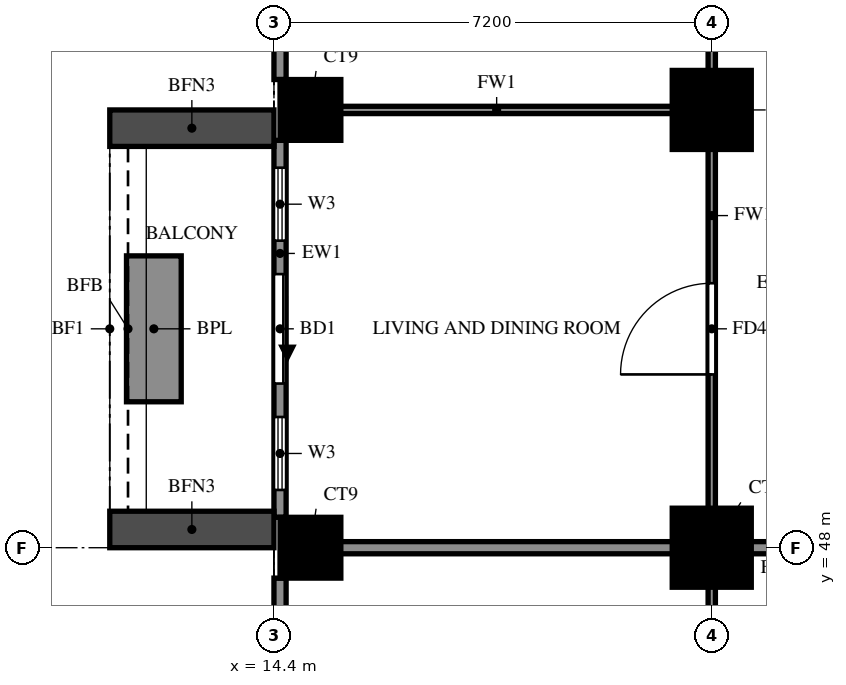
"""IFC4 building model, lengths in metres.
Left out: names, types, materials, properties, quantities, classifications, styles, units other than length and angle.
Written with IfcOpenShell. Run it as: python <this file> out.ifc"""

import sys

from ifc_helpers import new_model, si_unit, direction, frame, frame_2d, origin, origin_2d, place, context, subcontext, project, spatial, rectangle, extrude, source, transform, mapped, element, fill, save


model = new_model("IFC4")
c1 = context("Model", 3, precision=1e-05, world=origin(), true_north=direction((0.0, 1.0)))
c2 = subcontext(c1, "Body", "Model", "MODEL_VIEW")
j1 = project(units=[si_unit("LENGTHUNIT", "METRE"), si_unit("PLANEANGLEUNIT", "RADIAN")], contexts=[c1])
p1 = place(None, origin())
s1 = spatial("IfcSite", under=j1, at=p1, CompositionType="ELEMENT")
p2 = place(p1, origin())
s2 = spatial("IfcBuilding", under=s1, at=p2, CompositionType="ELEMENT")
p3 = place(p2, frame((0.0, 0.0, 79.5)))
s3 = spatial("IfcBuildingStorey", under=s2, at=p3, CompositionType="ELEMENT", Elevation=79.5)
m1 = source(origin(), c2, "Body", "SweptSolid", [
    extrude(rectangle(XDim=1.0, YDim=1.0, at=origin_2d()), origin(), (0.0, 0.0, 1.0), 3.18),
])
p4 = place(p3, frame((15.0, 48.0, 0.0), z_axis=(0.0, 0.0, 1.0), x_axis=(1.0, 0.0, 0.0)))
e1 = element("IfcColumn", 1, at=p4, inside=s3, PredefinedType="COLUMN", context=c2, shape_type="MappedRepresentation", body=[
    mapped(m1, transform((0.0, 0.0, 0.0))),
])
m2 = source(origin(), c2, "Body", "SweptSolid", [
    extrude(rectangle(XDim=1.3, YDim=1.3, at=origin_2d()), origin(), (0.0, 0.0, 1.0), 3.18),
])
p5 = place(p3, frame((21.6, 48.0, 0.0), z_axis=(0.0, 0.0, 1.0), x_axis=(1.0, 0.0, 0.0)))
e2 = element("IfcColumn", 2, at=p5, inside=s3, PredefinedType="COLUMN", context=c2, shape_type="MappedRepresentation", body=[
    mapped(m2, transform((0.0, 0.0, 0.0))),
])
p6 = place(p3, frame((15.0, 55.2, 0.0), z_axis=(0.0, 0.0, 1.0), x_axis=(1.0, 0.0, 0.0)))
e3 = element("IfcColumn", 3, at=p6, inside=s3, PredefinedType="COLUMN", context=c2, shape_type="MappedRepresentation", body=[
    mapped(m1, transform((0.0, 0.0, 0.0))),
])
p7 = place(p3, frame((21.6, 55.2, 0.0), z_axis=(0.0, 0.0, 1.0), x_axis=(1.0, 0.0, 0.0)))
e4 = element("IfcColumn", 4, at=p7, inside=s3, PredefinedType="COLUMN", context=c2, shape_type="MappedRepresentation", body=[
    mapped(m2, transform((0.0, 0.0, 0.0))),
])
p8 = place(p3, frame((14.5, 61.9, 0.0), z_axis=(0.0, 0.0, 1.0), x_axis=(0.0, -1.0, 0.0)))
e5 = element("IfcWall", 5, at=p8, inside=s3, PredefinedType="SOLIDWALL", context=c2, shape_type="SweptSolid", body=[
    extrude(rectangle(XDim=6.2, YDim=0.2, at=frame_2d((3.1, 0.0))), origin(), (0.0, 0.0, 1.0), 3.18),
])
p9 = place(p8, frame((3.65, 0.0, 0.6)))
e6 = element("IfcOpeningElement", 6, at=p9, cuts=e5, PredefinedType="OPENING", context=c2, shape_type="SweptSolid", body=[
    extrude(rectangle(XDim=1.8, YDim=2.4, at=frame_2d((0.9, 1.2))), frame((0.0, 0.11, 0.0), z_axis=(0.0, -1.0, 0.0), x_axis=(1.0, 0.0, 0.0)), (0.0, 0.0, 1.0), 0.22),
])
p10 = place(p8, frame((0.75, 0.0, 0.6)))
e7 = element("IfcOpeningElement", 7, at=p10, cuts=e5, PredefinedType="OPENING", context=c2, shape_type="SweptSolid", body=[
    extrude(rectangle(XDim=1.8, YDim=2.4, at=frame_2d((0.9, 1.2))), frame((0.0, 0.11, 0.0), z_axis=(0.0, -1.0, 0.0), x_axis=(1.0, 0.0, 0.0)), (0.0, 0.0, 1.0), 0.22),
])
p11 = place(p3, frame((14.5, 54.7, 0.0), z_axis=(0.0, 0.0, 1.0), x_axis=(0.0, -1.0, 0.0)))
e8 = element("IfcWall", 8, at=p11, inside=s3, PredefinedType="SOLIDWALL", context=c2, shape_type="SweptSolid", body=[
    extrude(rectangle(XDim=6.2, YDim=0.2, at=frame_2d((3.1, 0.0))), origin(), (0.0, 0.0, 1.0), 3.18),
])
p12 = place(p11, frame((2.2, 0.0, 0.0)))
e9 = element("IfcOpeningElement", 9, at=p12, cuts=e8, PredefinedType="OPENING", context=c2, shape_type="SweptSolid", body=[
    extrude(rectangle(XDim=1.8, YDim=2.4, at=frame_2d((0.9, 1.2))), frame((0.0, 0.11, 0.0), z_axis=(0.0, -1.0, 0.0), x_axis=(1.0, 0.0, 0.0)), (0.0, 0.0, 1.0), 0.22),
])
p13 = place(p11, frame((0.45, 0.0, 0.6)))
e10 = element("IfcOpeningElement", 10, at=p13, cuts=e8, PredefinedType="OPENING", context=c2, shape_type="SweptSolid", body=[
    extrude(rectangle(XDim=1.2, YDim=2.4, at=frame_2d((0.6, 1.2))), frame((0.0, 0.11, 0.0), z_axis=(0.0, -1.0, 0.0), x_axis=(1.0, 0.0, 0.0)), (0.0, 0.0, 1.0), 0.22),
])
p14 = place(p11, frame((4.55, 0.0, 0.6)))
e11 = element("IfcOpeningElement", 11, at=p14, cuts=e8, PredefinedType="OPENING", context=c2, shape_type="SweptSolid", body=[
    extrude(rectangle(XDim=1.2, YDim=2.4, at=frame_2d((0.6, 1.2))), frame((0.0, 0.11, 0.0), z_axis=(0.0, -1.0, 0.0), x_axis=(1.0, 0.0, 0.0)), (0.0, 0.0, 1.0), 0.22),
])
p15 = place(p3, frame((14.5, 47.5, 0.0), z_axis=(0.0, 0.0, 1.0), x_axis=(0.0, -1.0, 0.0)))
e12 = element("IfcWall", 12, at=p15, inside=s3, PredefinedType="SOLIDWALL", context=c2, shape_type="SweptSolid", body=[
    extrude(rectangle(XDim=6.2, YDim=0.2, at=frame_2d((3.1, 0.0))), origin(), (0.0, 0.0, 1.0), 3.18),
])
p16 = place(p15, frame((1.9, 0.0, 0.6)))
e13 = element("IfcOpeningElement", 13, at=p16, cuts=e12, PredefinedType="OPENING", context=c2, shape_type="SweptSolid", body=[
    extrude(rectangle(XDim=2.4, YDim=2.4, at=frame_2d((1.2, 1.2))), frame((0.0, 0.11, 0.0), z_axis=(0.0, -1.0, 0.0), x_axis=(1.0, 0.0, 0.0)), (0.0, 0.0, 1.0), 0.22),
])
for number, where, z_axis, x_axis in (
    (14, (14.4, 54.9, 0.0), (0.0, 0.0, 1.0), (-1.0, 0.0, 0.0)),
    (15, (14.4, 48.3, 0.0), (0.0, 0.0, 1.0), (-1.0, 0.0, 0.0)),
):
    element("IfcWall", number, at=place(p3, frame(where, z_axis=z_axis, x_axis=x_axis)), inside=s3, PredefinedType="SOLIDWALL", context=c2, shape_type="SweptSolid", body=[
        extrude(rectangle(XDim=2.7, YDim=0.6, at=frame_2d((1.35, 0.0))), origin(), (0.0, 0.0, 1.0), 2.85),
    ])
p17 = place(p3, frame((12.425, 52.8, 0.0), z_axis=(0.0, 0.0, 1.0), x_axis=(0.0, -1.0, 0.0)))
e16 = element("IfcWall", 16, at=p17, inside=s3, PredefinedType="SOLIDWALL", context=c2, shape_type="SweptSolid", body=[
    extrude(rectangle(XDim=2.4, YDim=0.9, at=frame_2d((1.2, 0.0))), origin(), (0.0, 0.0, 1.0), 0.9),
])
p18 = place(p3, frame((14.525, 48.0, 0.0), z_axis=(0.0, 0.0, 1.0), x_axis=(1.0, 0.0, 0.0)))
e17 = element("IfcWall", 17, at=p18, inside=s3, PredefinedType="SOLIDWALL", context=c2, shape_type="SweptSolid", body=[
    extrude(rectangle(XDim=14.275, YDim=0.2, at=frame_2d((7.138, 0.0))), origin(), (0.0, 0.0, 1.0), 3.18),
])
p19 = place(p3, frame((14.525, 55.2, 0.0), z_axis=(0.0, 0.0, 1.0), x_axis=(1.0, 0.0, 0.0)))
e18 = element("IfcWall", 18, at=p19, inside=s3, PredefinedType="PARTITIONING", context=c2, shape_type="SweptSolid", body=[
    extrude(rectangle(XDim=7.075, YDim=0.12, at=frame_2d((3.538, 0.0))), origin(), (0.0, 0.0, 1.0), 3.18),
])
p20 = place(p3, frame((21.6, 33.725, 0.0), z_axis=(0.0, 0.0, 1.0), x_axis=(0.0, 1.0, 0.0)))
e19 = element("IfcWall", 19, at=p20, inside=s3, PredefinedType="PARTITIONING", context=c2, shape_type="SweptSolid", body=[
    extrude(rectangle(XDim=39.475, YDim=0.12, at=frame_2d((19.737, 0.0))), origin(), (0.0, 0.0, 1.0), 3.18),
])
p21 = place(p20, frame((7.775, 0.0, 0.0)))
e20 = element("IfcOpeningElement", 20, at=p21, cuts=e19, PredefinedType="OPENING", context=c2, shape_type="SweptSolid", body=[
    extrude(rectangle(XDim=0.9, YDim=2.1, at=frame_2d((0.45, 1.05))), frame((0.0, 0.07, 0.0), z_axis=(0.0, -1.0, 0.0), x_axis=(1.0, 0.0, 0.0)), (0.0, 0.0, 1.0), 0.14),
])
p22 = place(p20, frame((17.125, 0.0, 0.0)))
e21 = element("IfcOpeningElement", 21, at=p22, cuts=e19, PredefinedType="OPENING", context=c2, shape_type="SweptSolid", body=[
    extrude(rectangle(XDim=1.5, YDim=2.1, at=frame_2d((0.75, 1.05))), frame((0.0, 0.07, 0.0), z_axis=(0.0, -1.0, 0.0), x_axis=(1.0, 0.0, 0.0)), (0.0, 0.0, 1.0), 0.14),
])
p23 = place(p20, frame((22.825, 0.0, 0.0)))
e22 = element("IfcOpeningElement", 22, at=p23, cuts=e19, PredefinedType="OPENING", context=c2, shape_type="SweptSolid", body=[
    extrude(rectangle(XDim=0.9, YDim=2.1, at=frame_2d((0.45, 1.05))), frame((0.0, 0.07, 0.0), z_axis=(0.0, -1.0, 0.0), x_axis=(1.0, 0.0, 0.0)), (0.0, 0.0, 1.0), 0.14),
])
p24 = place(p20, frame((26.425, 0.0, 0.0)))
e23 = element("IfcOpeningElement", 23, at=p24, cuts=e19, PredefinedType="OPENING", context=c2, shape_type="SweptSolid", body=[
    extrude(rectangle(XDim=0.9, YDim=2.1, at=frame_2d((0.45, 1.05))), frame((0.0, 0.07, 0.0), z_axis=(0.0, -1.0, 0.0), x_axis=(1.0, 0.0, 0.0)), (0.0, 0.0, 1.0), 0.14),
])
p25 = place(p20, frame((30.025, 0.0, 0.0)))
e24 = element("IfcOpeningElement", 24, at=p25, cuts=e19, PredefinedType="OPENING", context=c2, shape_type="SweptSolid", body=[
    extrude(rectangle(XDim=0.9, YDim=2.1, at=frame_2d((0.45, 1.05))), frame((0.0, 0.07, 0.0), z_axis=(0.0, -1.0, 0.0), x_axis=(1.0, 0.0, 0.0)), (0.0, 0.0, 1.0), 0.14),
])
p26 = place(p20, frame((33.625, 0.0, 0.0)))
e25 = element("IfcOpeningElement", 25, at=p26, cuts=e19, PredefinedType="OPENING", context=c2, shape_type="SweptSolid", body=[
    extrude(rectangle(XDim=0.9, YDim=2.1, at=frame_2d((0.45, 1.05))), frame((0.0, 0.07, 0.0), z_axis=(0.0, -1.0, 0.0), x_axis=(1.0, 0.0, 0.0)), (0.0, 0.0, 1.0), 0.14),
])
p27 = place(p20, frame((37.225, 0.0, 0.0)))
e26 = element("IfcOpeningElement", 26, at=p27, cuts=e19, PredefinedType="OPENING", context=c2, shape_type="SweptSolid", body=[
    extrude(rectangle(XDim=0.9, YDim=2.1, at=frame_2d((0.45, 1.05))), frame((0.0, 0.07, 0.0), z_axis=(0.0, -1.0, 0.0), x_axis=(1.0, 0.0, 0.0)), (0.0, 0.0, 1.0), 0.14),
])
p28 = place(p12, origin())
e27 = element("IfcDoor", 27, at=p28, inside=s3, OperationType="DOUBLE_DOOR_SLIDING", PredefinedType="DOOR", context=c2, shape_type="SweptSolid", body=[
    extrude(rectangle(XDim=1.8, YDim=2.4, at=frame_2d((0.9, 1.2))), frame((0.0, 0.025, 0.0), z_axis=(0.0, -1.0, 0.0), x_axis=(1.0, 0.0, 0.0)), (0.0, 0.0, 1.0), 0.05),
])
fill(e9, e27)
p29 = place(p13, origin())
e28 = element("IfcWindow", 28, at=p29, inside=s3, PartitioningType="SINGLE_PANEL", PredefinedType="WINDOW", context=c2, shape_type="SweptSolid", body=[
    extrude(rectangle(XDim=1.2, YDim=2.4, at=frame_2d((0.6, 1.2))), frame((0.0, 0.03, 0.0), z_axis=(0.0, -1.0, 0.0), x_axis=(1.0, 0.0, 0.0)), (0.0, 0.0, 1.0), 0.06),
])
fill(e10, e28)
p30 = place(p14, origin())
e29 = element("IfcWindow", 29, at=p30, inside=s3, PartitioningType="SINGLE_PANEL", PredefinedType="WINDOW", context=c2, shape_type="SweptSolid", body=[
    extrude(rectangle(XDim=1.2, YDim=2.4, at=frame_2d((0.6, 1.2))), frame((0.0, 0.03, 0.0), z_axis=(0.0, -1.0, 0.0), x_axis=(1.0, 0.0, 0.0)), (0.0, 0.0, 1.0), 0.06),
])
fill(e11, e29)
p31 = place(p22, origin())
e30 = element("IfcDoor", 30, at=p31, inside=s3, OperationType="SINGLE_SWING_RIGHT", PredefinedType="DOOR", context=c2, shape_type="SweptSolid", body=[
    extrude(rectangle(XDim=1.5, YDim=2.1, at=frame_2d((0.75, 1.05))), frame((0.0, 0.025, 0.0), z_axis=(0.0, -1.0, 0.0), x_axis=(1.0, 0.0, 0.0)), (0.0, 0.0, 1.0), 0.05),
])
fill(e21, e30)
save(model, sys.argv[1])
